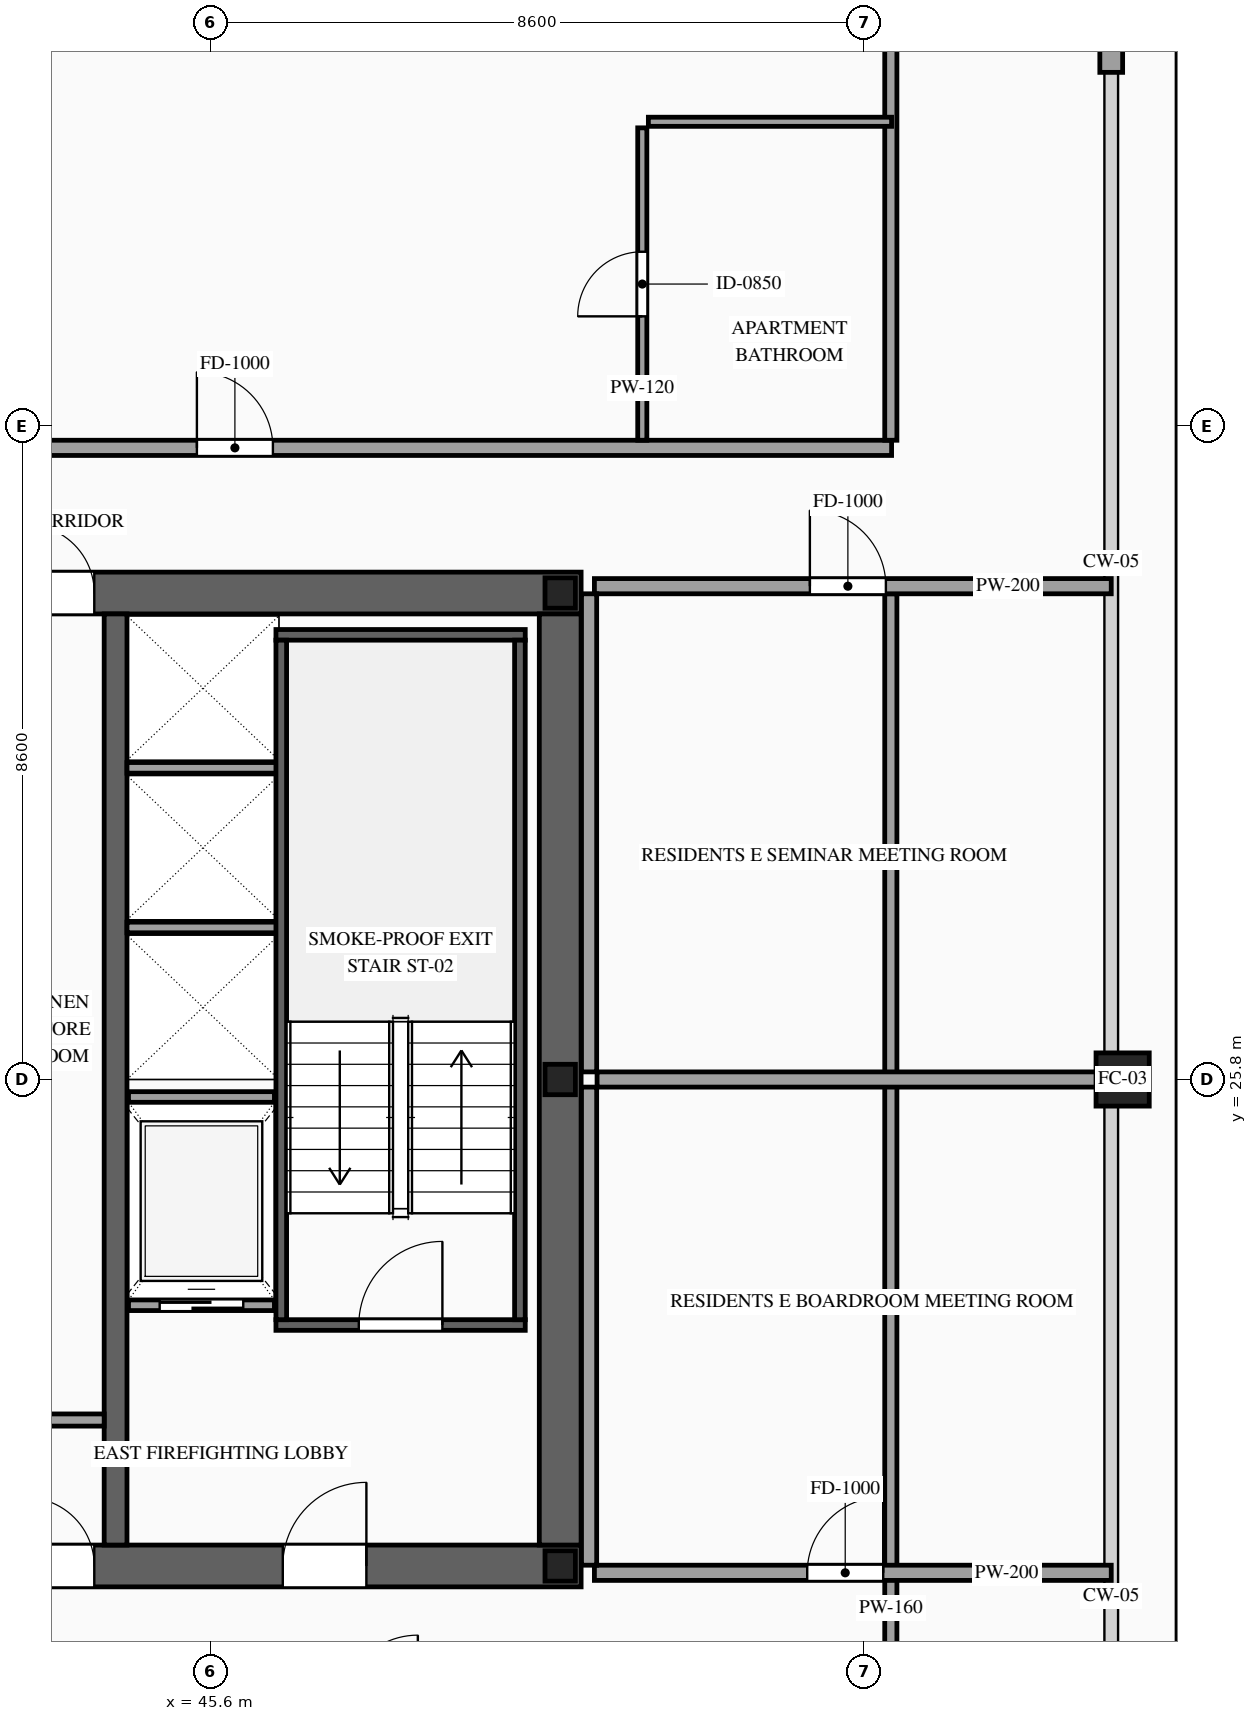
"""IFC4 building model, lengths in metres.
Left out: names, types, materials, properties, quantities, classifications, styles, units other than length and angle.
Written with IfcOpenShell. Run it as: python <this file> out.ifc"""

import sys

from ifc_helpers import new_model, si_unit, direction, frame, frame_2d, origin, origin_2d, place, context, subcontext, project, spatial, rectangle, hollow_rectangle, i_section, extrude, source, transform, mapped, element, fill, save


model = new_model("IFC4")
c1 = context("Model", 3, precision=1e-05, world=origin(), true_north=direction((0.0, 1.0)))
c2 = subcontext(c1, "Body", "Model", "MODEL_VIEW")
j1 = project(units=[si_unit("LENGTHUNIT", "METRE"), si_unit("PLANEANGLEUNIT", "RADIAN")], contexts=[c1])
p1 = place(None, origin())
s1 = spatial("IfcSite", under=j1, at=p1, CompositionType="ELEMENT")
p2 = place(p1, origin())
s2 = spatial("IfcBuilding", under=s1, at=p2, CompositionType="ELEMENT")
p3 = place(p2, frame((0.0, 0.0, 224.1)))
s3 = spatial("IfcBuildingStorey", under=s2, at=p3, CompositionType="ELEMENT", Elevation=224.1)
p4 = place(p3, frame((23.525, 19.4, 0.0), z_axis=(0.0, 0.0, 1.0), x_axis=(1.0, 0.0, 0.0)))
e1 = element("IfcWall", 1, at=p4, inside=s3, PredefinedType="SHEAR", context=c2, shape_type="SweptSolid", body=[
    extrude(rectangle(XDim=26.95, YDim=0.55, at=frame_2d((13.475, 0.0))), origin(), (0.0, 0.0, 1.0), 3.5),
])
p5 = place(p4, frame((1.925, 0.0, 0.0)))
e2 = element("IfcOpeningElement", 2, at=p5, cuts=e1, PredefinedType="OPENING", context=c2, shape_type="SweptSolid", body=[
    extrude(rectangle(XDim=1.1, YDim=2.2, at=frame_2d((0.55, 1.1))), frame((0.0, 0.29, 0.0), z_axis=(0.0, -1.0, 0.0), x_axis=(1.0, 0.0, 0.0)), (0.0, 0.0, 1.0), 0.58),
])
p6 = place(p4, frame((9.825, 0.0, 0.0)))
e3 = element("IfcOpeningElement", 3, at=p6, cuts=e1, PredefinedType="OPENING", context=c2, shape_type="SweptSolid", body=[
    extrude(rectangle(XDim=1.1, YDim=2.2, at=frame_2d((0.55, 1.1))), frame((0.0, 0.29, 0.0), z_axis=(0.0, -1.0, 0.0), x_axis=(1.0, 0.0, 0.0)), (0.0, 0.0, 1.0), 0.58),
])
p7 = place(p4, frame((23.025, 0.0, 0.0)))
e4 = element("IfcOpeningElement", 4, at=p7, cuts=e1, PredefinedType="OPENING", context=c2, shape_type="SweptSolid", body=[
    extrude(rectangle(XDim=1.1, YDim=2.2, at=frame_2d((0.55, 1.1))), frame((0.0, 0.29, 0.0), z_axis=(0.0, -1.0, 0.0), x_axis=(1.0, 0.0, 0.0)), (0.0, 0.0, 1.0), 0.58),
])
p8 = place(p4, frame((19.645, 0.0, 0.0)))
e5 = element("IfcOpeningElement", 5, at=p8, cuts=e1, PredefinedType="OPENING", context=c2, shape_type="SweptSolid", body=[
    extrude(rectangle(XDim=0.9, YDim=2.15, at=frame_2d((0.45, 1.075))), frame((0.0, 0.29, 0.0), z_axis=(0.0, -1.0, 0.0), x_axis=(1.0, 0.0, 0.0)), (0.0, 0.0, 1.0), 0.58),
])
p9 = place(p4, frame((18.205, 0.0, 0.0)))
e6 = element("IfcOpeningElement", 6, at=p9, cuts=e1, PredefinedType="OPENING", context=c2, shape_type="SweptSolid", body=[
    extrude(rectangle(XDim=0.9, YDim=2.15, at=frame_2d((0.45, 1.075))), frame((0.0, 0.29, 0.0), z_axis=(0.0, -1.0, 0.0), x_axis=(1.0, 0.0, 0.0)), (0.0, 0.0, 1.0), 0.58),
])
p10 = place(p3, frame((23.525, 32.2, 0.0), z_axis=(0.0, 0.0, 1.0), x_axis=(1.0, 0.0, 0.0)))
e7 = element("IfcWall", 7, at=p10, inside=s3, PredefinedType="SHEAR", context=c2, shape_type="SweptSolid", body=[
    extrude(rectangle(XDim=26.95, YDim=0.55, at=frame_2d((13.475, 0.0))), origin(), (0.0, 0.0, 1.0), 3.5),
])
p11 = place(p10, frame((4.545, 0.0, 0.0)))
e8 = element("IfcOpeningElement", 8, at=p11, cuts=e7, PredefinedType="OPENING", context=c2, shape_type="SweptSolid", body=[
    extrude(rectangle(XDim=0.9, YDim=2.15, at=frame_2d((0.45, 1.075))), frame((0.0, 0.29, 0.0), z_axis=(0.0, -1.0, 0.0), x_axis=(1.0, 0.0, 0.0)), (0.0, 0.0, 1.0), 0.58),
])
p12 = place(p10, frame((9.825, 0.0, 0.0)))
e9 = element("IfcOpeningElement", 9, at=p12, cuts=e7, PredefinedType="OPENING", context=c2, shape_type="SweptSolid", body=[
    extrude(rectangle(XDim=1.1, YDim=2.2, at=frame_2d((0.55, 1.1))), frame((0.0, 0.29, 0.0), z_axis=(0.0, -1.0, 0.0), x_axis=(1.0, 0.0, 0.0)), (0.0, 0.0, 1.0), 0.58),
])
p13 = place(p10, frame((15.675, 0.0, 0.0)))
e10 = element("IfcOpeningElement", 10, at=p13, cuts=e7, PredefinedType="OPENING", context=c2, shape_type="SweptSolid", body=[
    extrude(rectangle(XDim=1.1, YDim=2.2, at=frame_2d((0.55, 1.1))), frame((0.0, 0.29, 0.0), z_axis=(0.0, -1.0, 0.0), x_axis=(1.0, 0.0, 0.0)), (0.0, 0.0, 1.0), 0.58),
])
p14 = place(p10, frame((19.645, 0.0, 0.0)))
e11 = element("IfcOpeningElement", 11, at=p14, cuts=e7, PredefinedType="OPENING", context=c2, shape_type="SweptSolid", body=[
    extrude(rectangle(XDim=0.9, YDim=2.15, at=frame_2d((0.45, 1.075))), frame((0.0, 0.29, 0.0), z_axis=(0.0, -1.0, 0.0), x_axis=(1.0, 0.0, 0.0)), (0.0, 0.0, 1.0), 0.58),
])
m1 = source(origin(), c2, "Body", "SweptSolid", [
    extrude(rectangle(XDim=12.25, YDim=0.55, at=frame_2d((6.125, 0.0))), origin(), (0.0, 0.0, 1.0), 3.5),
])
p15 = place(p3, frame((50.2, 19.675, 0.0), z_axis=(0.0, 0.0, 1.0), x_axis=(0.0, 1.0, 0.0)))
e12 = element("IfcWall", 12, at=p15, inside=s3, PredefinedType="SHEAR", context=c2, shape_type="MappedRepresentation", body=[
    mapped(m1, transform((0.0, 0.0, 0.0), scale=1.0)),
])
m2 = source(origin(), c2, "Body", "SweptSolid", [
    extrude(rectangle(XDim=12.25, YDim=0.3, at=frame_2d((6.125, 0.0))), origin(), (0.0, 0.0, 1.0), 3.5),
])
p16 = place(p3, frame((44.35, 19.675, 0.0), z_axis=(0.0, 0.0, 1.0), x_axis=(0.0, 1.0, 0.0)))
e13 = element("IfcWall", 13, at=p16, inside=s3, PredefinedType="SOLIDWALL", context=c2, shape_type="MappedRepresentation", body=[
    mapped(m2, transform((0.0, 0.0, 0.0), scale=1.0)),
])
m3 = source(origin(), c2, "Body", "SweptSolid", [
    extrude(i_section(OverallWidth=0.4, OverallDepth=0.4, WebThickness=0.013, FlangeThickness=0.021, at=origin_2d()), origin(), (0.0, 0.0, 1.0), 3.5),
])
for number, where, z_axis, x_axis in (
    (14, (50.2, 19.4, 0.0), (0.0, 0.0, 1.0), (1.0, 0.0, 0.0)),
    (15, (50.2, 25.8, 0.0), (0.0, 0.0, 1.0), (1.0, 0.0, 0.0)),
    (16, (50.2, 32.2, 0.0), (0.0, 0.0, 1.0), (1.0, 0.0, 0.0)),
):
    element("IfcColumn", number, at=place(p3, frame(where, z_axis=z_axis, x_axis=x_axis)), inside=s3, PredefinedType="COLUMN", context=c2, shape_type="MappedRepresentation", body=[
        mapped(m3, transform((0.0, 0.0, 0.0), scale=1.0)),
    ])
m4 = source(origin(), c2, "Body", "SweptSolid", [
    extrude(hollow_rectangle(XDim=0.7, YDim=0.7, WallThickness=0.032, at=origin_2d()), origin(), (0.0, 0.0, 1.0), 3.5),
])
p17 = place(p3, frame((57.6, 25.8, 0.0), z_axis=(0.0, 0.0, 1.0), x_axis=(1.0, 0.0, 0.0)))
e17 = element("IfcColumn", 17, at=p17, inside=s3, PredefinedType="COLUMN", context=c2, shape_type="MappedRepresentation", body=[
    mapped(m4, transform((0.0, 0.0, 0.0), scale=1.0)),
])
m5 = source(origin(), c2, "Body", "SweptSolid", [
    extrude(rectangle(XDim=3.15, YDim=0.3, at=frame_2d((1.575, 0.0))), origin(), (0.0, 0.0, 1.0), 2.835),
])
p18 = place(p3, frame((57.45, 39.05, 0.0), z_axis=(0.0, 0.0, 1.0), x_axis=(0.0, 1.0, 0.0)))
e18 = element("IfcWall", 18, at=p18, inside=s3, PredefinedType="SOLIDWALL", context=c2, shape_type="MappedRepresentation", body=[
    mapped(m5, transform((0.0, 0.0, 0.0), scale=1.0)),
])
p19 = place(p3, frame((44.52, 22.83, 0.0), z_axis=(0.0, 0.0, 1.0), x_axis=(1.0, 0.0, 0.0)))
e19 = element("IfcWall", 19, at=p19, inside=s3, PredefinedType="SOLIDWALL", context=c2, shape_type="SweptSolid", body=[
    extrude(rectangle(XDim=1.92, YDim=0.14, at=frame_2d((0.96, 0.0))), origin(), (0.0, 0.0, 1.0), 3.28),
])
p20 = place(p19, frame((0.41, 0.0, 0.0)))
e20 = element("IfcOpeningElement", 20, at=p20, cuts=e19, PredefinedType="OPENING", context=c2, shape_type="SweptSolid", body=[
    extrude(rectangle(XDim=1.1, YDim=2.2, at=frame_2d((0.55, 1.1))), frame((0.0, 0.085, 0.0), z_axis=(0.0, -1.0, 0.0), x_axis=(1.0, 0.0, 0.0)), (0.0, 0.0, 1.0), 0.17),
])
m6 = source(origin(), c2, "Body", "SweptSolid", [
    extrude(rectangle(XDim=1.92, YDim=0.14, at=frame_2d((0.96, 0.0))), origin(), (0.0, 0.0, 1.0), 3.28),
])
p21 = place(p3, frame((44.52, 25.57, 0.0), z_axis=(0.0, 0.0, 1.0), x_axis=(1.0, 0.0, 0.0)))
e21 = element("IfcWall", 21, at=p21, inside=s3, PredefinedType="SOLIDWALL", context=c2, shape_type="MappedRepresentation", body=[
    mapped(m6, transform((0.0, 0.0, 0.0), scale=1.0)),
])
m7 = source(origin(), c2, "Body", "SweptSolid", [
    extrude(rectangle(XDim=2.0, YDim=0.14, at=frame_2d((1.0, 0.0))), origin(), (0.0, 0.0, 1.0), 3.28),
])
for number, where, z_axis, x_axis in (
    (22, (44.5, 27.8, 0.0), (0.0, 0.0, 1.0), (1.0, 0.0, 0.0)),
    (23, (44.5, 29.9, 0.0), (0.0, 0.0, 1.0), (1.0, 0.0, 0.0)),
):
    element("IfcWall", number, at=place(p3, frame(where, z_axis=z_axis, x_axis=x_axis)), inside=s3, PredefinedType="SOLIDWALL", context=c2, shape_type="MappedRepresentation", body=[
        mapped(m7, transform((0.0, 0.0, 0.0), scale=1.0)),
    ])
p22 = place(p3, frame((46.46, 22.57, 0.0), z_axis=(0.0, 0.0, 1.0), x_axis=(1.0, 0.0, 0.0)))
e24 = element("IfcWall", 24, at=p22, inside=s3, PredefinedType="SOLIDWALL", context=c2, shape_type="SweptSolid", body=[
    extrude(rectangle(XDim=3.28, YDim=0.14, at=frame_2d((1.64, 0.0))), origin(), (0.0, 0.0, 1.0), 3.28),
])
p23 = place(p22, frame((1.09, 0.0, 0.0)))
e25 = element("IfcOpeningElement", 25, at=p23, cuts=e24, PredefinedType="OPENING", context=c2, shape_type="SweptSolid", body=[
    extrude(rectangle(XDim=1.1, YDim=2.2, at=frame_2d((0.55, 1.1))), frame((0.0, 0.085, 0.0), z_axis=(0.0, -1.0, 0.0), x_axis=(1.0, 0.0, 0.0)), (0.0, 0.0, 1.0), 0.17),
])
m8 = source(origin(), c2, "Body", "SweptSolid", [
    extrude(rectangle(XDim=3.28, YDim=0.14, at=frame_2d((1.64, 0.0))), origin(), (0.0, 0.0, 1.0), 3.28),
])
p24 = place(p3, frame((46.46, 31.65, 0.0), z_axis=(0.0, 0.0, 1.0), x_axis=(1.0, 0.0, 0.0)))
e26 = element("IfcWall", 26, at=p24, inside=s3, PredefinedType="SOLIDWALL", context=c2, shape_type="MappedRepresentation", body=[
    mapped(m8, transform((0.0, 0.0, 0.0), scale=1.0)),
])
m9 = source(origin(), c2, "Body", "SweptSolid", [
    extrude(rectangle(XDim=8.94, YDim=0.14, at=frame_2d((4.47, 0.0))), origin(), (0.0, 0.0, 1.0), 3.28),
])
for number, where, z_axis, x_axis in (
    (27, (46.53, 22.64, 0.0), (0.0, 0.0, 1.0), (0.0, 1.0, 0.0)),
    (28, (49.67, 22.64, 0.0), (0.0, 0.0, 1.0), (0.0, 1.0, 0.0)),
):
    element("IfcWall", number, at=place(p3, frame(where, z_axis=z_axis, x_axis=x_axis)), inside=s3, PredefinedType="SOLIDWALL", context=c2, shape_type="MappedRepresentation", body=[
        mapped(m9, transform((0.0, 0.0, 0.0), scale=1.0)),
    ])
m10 = source(origin(), c2, "Body", "SweptSolid", [
    extrude(rectangle(XDim=1.17, YDim=0.16, at=frame_2d((0.585, 0.0))), origin(), (0.0, 0.0, 1.0), 3.28),
])
p25 = place(p3, frame((43.03, 21.32, 0.0), z_axis=(0.0, 0.0, 1.0), x_axis=(1.0, 0.0, 0.0)))
e29 = element("IfcWall", 29, at=p25, inside=s3, PredefinedType="PARTITIONING", context=c2, shape_type="MappedRepresentation", body=[
    mapped(m10, transform((0.0, 0.0, 0.0), scale=1.0)),
])
p26 = place(p3, frame((37.08, 34.11, 0.0), z_axis=(0.0, 0.0, 1.0), x_axis=(1.0, 0.0, 0.0)))
e30 = element("IfcWall", 30, at=p26, inside=s3, PredefinedType="PARTITIONING", context=c2, shape_type="SweptSolid", body=[
    extrude(rectangle(XDim=17.48, YDim=0.2, at=frame_2d((8.74, 0.0))), origin(), (0.0, 0.0, 1.0), 3.28),
])
p27 = place(p26, frame((8.34, 0.0, 0.0)))
e31 = element("IfcOpeningElement", 31, at=p27, cuts=e30, PredefinedType="OPENING", context=c2, shape_type="SweptSolid", body=[
    extrude(rectangle(XDim=1.0, YDim=2.2, at=frame_2d((0.5, 1.1))), frame((0.0, 0.115, 0.0), z_axis=(0.0, -1.0, 0.0), x_axis=(1.0, 0.0, 0.0)), (0.0, 0.0, 1.0), 0.23),
])
m11 = source(origin(), c2, "Body", "SweptSolid", [
    extrude(rectangle(XDim=11.89, YDim=0.16, at=frame_2d((5.945, 0.0))), origin(), (0.0, 0.0, 1.0), 3.28),
])
p28 = place(p3, frame((54.55, 34.21, 0.0), z_axis=(0.0, 0.0, 1.0), x_axis=(0.0, 1.0, 0.0)))
e32 = element("IfcWall", 32, at=p28, inside=s3, PredefinedType="PARTITIONING", context=c2, shape_type="MappedRepresentation", body=[
    mapped(m11, transform((0.0, 0.0, 0.0), scale=1.0)),
])
m12 = source(origin(), c2, "Body", "SweptSolid", [
    extrude(rectangle(XDim=3.2, YDim=0.12, at=frame_2d((1.6, 0.0))), origin(), (0.0, 0.0, 1.0), 3.28),
])
p29 = place(p3, frame((51.36, 38.4, 0.0), z_axis=(0.0, 0.0, 1.0), x_axis=(1.0, 0.0, 0.0)))
e33 = element("IfcWall", 33, at=p29, inside=s3, PredefinedType="PARTITIONING", context=c2, shape_type="MappedRepresentation", body=[
    mapped(m12, transform((0.0, 0.0, 0.0), scale=1.0)),
])
p30 = place(p3, frame((51.28, 34.21, 0.0), z_axis=(0.0, 0.0, 1.0), x_axis=(0.0, 1.0, 0.0)))
e34 = element("IfcWall", 34, at=p30, inside=s3, PredefinedType="PARTITIONING", context=c2, shape_type="SweptSolid", body=[
    extrude(rectangle(XDim=4.11, YDim=0.12, at=frame_2d((2.055, 0.0))), origin(), (0.0, 0.0, 1.0), 3.28),
])
p31 = place(p30, frame((1.63, 0.0, 0.0)))
e35 = element("IfcOpeningElement", 35, at=p31, cuts=e34, PredefinedType="OPENING", context=c2, shape_type="SweptSolid", body=[
    extrude(rectangle(XDim=0.85, YDim=2.1, at=frame_2d((0.425, 1.05))), frame((0.0, 0.075, 0.0), z_axis=(0.0, -1.0, 0.0), x_axis=(1.0, 0.0, 0.0)), (0.0, 0.0, 1.0), 0.15),
])
m13 = source(origin(), c2, "Body", "SweptSolid", [
    extrude(rectangle(XDim=26.69, YDim=0.16, at=frame_2d((13.345, 0.0))), origin(), (0.0, 0.0, 1.0), 3.28),
])
p32 = place(p3, frame((54.55, 5.5, 0.0), z_axis=(0.0, 0.0, 1.0), x_axis=(0.0, 1.0, 0.0)))
e36 = element("IfcWall", 36, at=p32, inside=s3, PredefinedType="PARTITIONING", context=c2, shape_type="MappedRepresentation", body=[
    mapped(m13, transform((0.0, 0.0, 0.0), scale=1.0)),
])
p33 = place(p3, frame((50.65, 19.31, 0.0), z_axis=(0.0, 0.0, 1.0), x_axis=(1.0, 0.0, 0.0)))
e37 = element("IfcWall", 37, at=p33, inside=s3, PredefinedType="PARTITIONING", context=c2, shape_type="SweptSolid", body=[
    extrude(rectangle(XDim=6.8, YDim=0.2, at=frame_2d((3.4, 0.0))), origin(), (0.0, 0.0, 1.0), 2.825),
])
p34 = place(p33, frame((2.8, 0.0, 0.0)))
e38 = element("IfcOpeningElement", 38, at=p34, cuts=e37, PredefinedType="OPENING", context=c2, shape_type="SweptSolid", body=[
    extrude(rectangle(XDim=1.0, YDim=2.2, at=frame_2d((0.5, 1.1))), frame((0.0, 0.115, 0.0), z_axis=(0.0, -1.0, 0.0), x_axis=(1.0, 0.0, 0.0)), (0.0, 0.0, 1.0), 0.23),
])
m14 = source(origin(), c2, "Body", "SweptSolid", [
    extrude(rectangle(XDim=6.765, YDim=0.2, at=frame_2d((3.382, 0.0))), origin(), (0.0, 0.0, 1.0), 2.787),
])
p35 = place(p3, frame((50.685, 25.8, 0.0), z_axis=(0.0, 0.0, 1.0), x_axis=(1.0, 0.0, 0.0)))
e39 = element("IfcWall", 39, at=p35, inside=s3, PredefinedType="PARTITIONING", context=c2, shape_type="MappedRepresentation", body=[
    mapped(m14, transform((0.0, 0.0, 0.0), scale=1.0)),
])
m15 = source(origin(), c2, "Body", "SweptSolid", [
    extrude(rectangle(XDim=6.29, YDim=0.2, at=frame_2d((3.145, 0.0))), origin(), (0.0, 0.0, 1.0), 3.28),
])
p36 = place(p3, frame((50.58, 19.41, 0.0), z_axis=(0.0, 0.0, 1.0), x_axis=(0.0, 1.0, 0.0)))
e40 = element("IfcWall", 40, at=p36, inside=s3, PredefinedType="PARTITIONING", context=c2, shape_type="MappedRepresentation", body=[
    mapped(m15, transform((0.0, 0.0, 0.0), scale=1.0)),
])
p37 = place(p3, frame((50.65, 32.29, 0.0), z_axis=(0.0, 0.0, 1.0), x_axis=(1.0, 0.0, 0.0)))
e41 = element("IfcWall", 41, at=p37, inside=s3, PredefinedType="PARTITIONING", context=c2, shape_type="SweptSolid", body=[
    extrude(rectangle(XDim=6.8, YDim=0.2, at=frame_2d((3.4, 0.0))), origin(), (0.0, 0.0, 1.0), 2.825),
])
p38 = place(p37, frame((2.835, 0.0, 0.0)))
e42 = element("IfcOpeningElement", 42, at=p38, cuts=e41, PredefinedType="OPENING", context=c2, shape_type="SweptSolid", body=[
    extrude(rectangle(XDim=1.0, YDim=2.2, at=frame_2d((0.5, 1.1))), frame((0.0, 0.115, 0.0), z_axis=(0.0, -1.0, 0.0), x_axis=(1.0, 0.0, 0.0)), (0.0, 0.0, 1.0), 0.23),
])
p39 = place(p3, frame((50.58, 25.9, 0.0), z_axis=(0.0, 0.0, 1.0), x_axis=(0.0, 1.0, 0.0)))
e43 = element("IfcWall", 43, at=p39, inside=s3, PredefinedType="PARTITIONING", context=c2, shape_type="MappedRepresentation", body=[
    mapped(m15, transform((0.0, 0.0, 0.0), scale=1.0)),
])
m16 = source(origin(), c2, "Body", "SweptSolid", [
    extrude(rectangle(XDim=1.1, YDim=2.2, at=frame_2d((0.55, 1.1))), frame((0.0, 0.025, 0.0), z_axis=(0.0, -1.0, 0.0), x_axis=(1.0, 0.0, 0.0)), (0.0, 0.0, 1.0), 0.05),
])
p40 = place(p20, origin())
e44 = element("IfcDoor", 44, at=p40, inside=s3, OperationType="SLIDING_TO_RIGHT", PredefinedType="DOOR", context=c2, shape_type="MappedRepresentation", body=[
    mapped(m16, transform((0.0, 0.0, 0.0), scale=1.0)),
])
fill(e20, e44)
m17 = source(origin(), c2, "Body", "SweptSolid", [
    extrude(rectangle(XDim=1.1, YDim=2.2, at=frame_2d((0.55, 1.1))), frame((0.0, 0.025, 0.0), z_axis=(0.0, -1.0, 0.0), x_axis=(1.0, 0.0, 0.0)), (0.0, 0.0, 1.0), 0.05),
])
p41 = place(p23, origin())
e45 = element("IfcDoor", 45, at=p41, inside=s3, OperationType="SINGLE_SWING_RIGHT", PredefinedType="DOOR", context=c2, shape_type="MappedRepresentation", body=[
    mapped(m17, transform((0.0, 0.0, 0.0), scale=1.0)),
])
fill(e25, e45)
p42 = place(p7, origin())
e46 = element("IfcDoor", 46, at=p42, inside=s3, OperationType="SINGLE_SWING_RIGHT", PredefinedType="DOOR", context=c2, shape_type="MappedRepresentation", body=[
    mapped(m17, transform((0.0, 0.0, 0.0), scale=1.0)),
])
fill(e4, e46)
m18 = source(origin(), c2, "Body", "SweptSolid", [
    extrude(rectangle(XDim=0.9, YDim=2.15, at=frame_2d((0.45, 1.075))), frame((0.0, 0.025, 0.0), z_axis=(0.0, -1.0, 0.0), x_axis=(1.0, 0.0, 0.0)), (0.0, 0.0, 1.0), 0.05),
])
p43 = place(p8, origin())
e47 = element("IfcDoor", 47, at=p43, inside=s3, OperationType="SINGLE_SWING_LEFT", PredefinedType="DOOR", context=c2, shape_type="MappedRepresentation", body=[
    mapped(m18, transform((0.0, 0.0, 0.0), scale=1.0)),
])
fill(e5, e47)
p44 = place(p14, origin())
e48 = element("IfcDoor", 48, at=p44, inside=s3, OperationType="SINGLE_SWING_LEFT", PredefinedType="DOOR", context=c2, shape_type="MappedRepresentation", body=[
    mapped(m18, transform((0.0, 0.0, 0.0), scale=1.0)),
])
fill(e11, e48)
m19 = source(origin(), c2, "Body", "SweptSolid", [
    extrude(rectangle(XDim=1.0, YDim=2.2, at=frame_2d((0.5, 1.1))), frame((0.0, 0.025, 0.0), z_axis=(0.0, -1.0, 0.0), x_axis=(1.0, 0.0, 0.0)), (0.0, 0.0, 1.0), 0.05),
])
p45 = place(p27, origin())
e49 = element("IfcDoor", 49, at=p45, inside=s3, OperationType="SINGLE_SWING_LEFT", PredefinedType="DOOR", context=c2, shape_type="MappedRepresentation", body=[
    mapped(m19, transform((0.0, 0.0, 0.0), scale=1.0)),
])
fill(e31, e49)
m20 = source(origin(), c2, "Body", "SweptSolid", [
    extrude(rectangle(XDim=0.85, YDim=2.1, at=frame_2d((0.425, 1.05))), frame((0.0, 0.025, 0.0), z_axis=(0.0, -1.0, 0.0), x_axis=(1.0, 0.0, 0.0)), (0.0, 0.0, 1.0), 0.05),
])
p46 = place(p31, origin())
e50 = element("IfcDoor", 50, at=p46, inside=s3, OperationType="SINGLE_SWING_LEFT", PredefinedType="DOOR", context=c2, shape_type="MappedRepresentation", body=[
    mapped(m20, transform((0.0, 0.0, 0.0), scale=1.0)),
])
fill(e35, e50)
p47 = place(p34, origin())
e51 = element("IfcDoor", 51, at=p47, inside=s3, OperationType="SINGLE_SWING_RIGHT", PredefinedType="DOOR", context=c2, shape_type="MappedRepresentation", body=[
    mapped(m19, transform((0.0, 0.0, 0.0), scale=1.0)),
])
fill(e38, e51)
p48 = place(p38, origin())
e52 = element("IfcDoor", 52, at=p48, inside=s3, OperationType="SINGLE_SWING_LEFT", PredefinedType="DOOR", context=c2, shape_type="MappedRepresentation", body=[
    mapped(m19, transform((0.0, 0.0, 0.0), scale=1.0)),
])
fill(e42, e52)
save(model, sys.argv[1])
